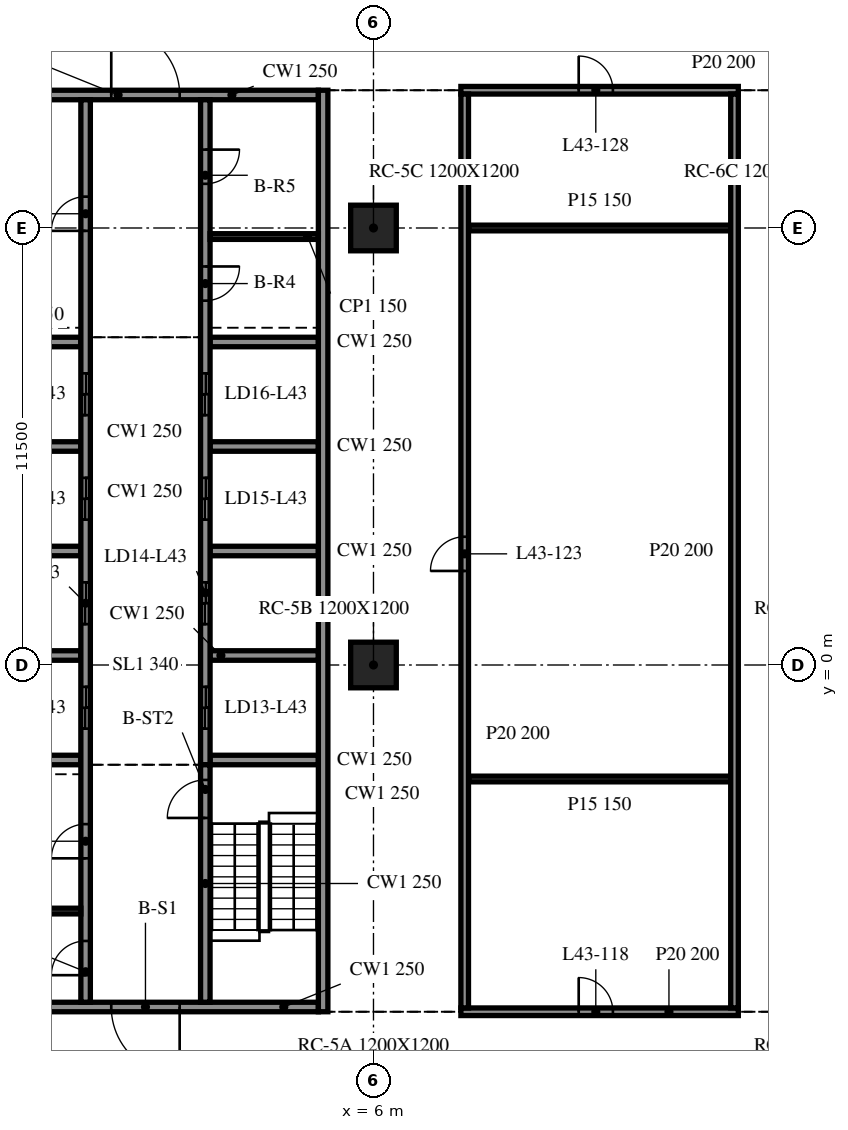
"""IFC4 building model, lengths in metres.
Left out: names, types, materials, properties, quantities, classifications, styles, units other than length and angle.
Written with IfcOpenShell. Run it as: python <this file> out.ifc"""

import sys

from ifc_helpers import new_model, si_unit, direction, frame, frame_2d, origin, origin_2d, place, context, subcontext, project, spatial, rectangle, extrude, element, fill, save


model = new_model("IFC4")
c1 = context("Model", 3, precision=1e-05, world=origin(), true_north=direction((0.0, 1.0)))
c2 = subcontext(c1, "Body", "Model", "MODEL_VIEW")
j1 = project(units=[si_unit("LENGTHUNIT", "METRE"), si_unit("PLANEANGLEUNIT", "RADIAN")], contexts=[c1])
p1 = place(None, origin())
s1 = spatial("IfcSite", under=j1, at=p1, CompositionType="ELEMENT")
p2 = place(p1, origin())
s2 = spatial("IfcBuilding", under=s1, at=p2, CompositionType="ELEMENT")
p3 = place(p2, frame((0.0, 0.0, 182.0)))
s3 = spatial("IfcBuildingStorey", under=s2, at=p3, CompositionType="ELEMENT", Elevation=182.0)
for number, where, z_axis, x_axis in (
    (1, (6.0, 0.0, -0.34), (0.0, 0.0, 1.0), (1.0, 0.0, 0.0)),
    (2, (6.0, 11.5, -0.34), (0.0, 0.0, 1.0), (1.0, 0.0, 0.0)),
):
    element("IfcColumn", number, at=place(p3, frame(where, z_axis=z_axis, x_axis=x_axis)), inside=s3, PredefinedType="COLUMN", context=c2, shape_type="SweptSolid", body=[
        extrude(rectangle(XDim=1.2, YDim=1.2, at=origin_2d()), origin(), (0.0, 0.0, 1.0), 3.8),
    ])
p4 = place(p3, frame((4.675, -9.125, 0.0), z_axis=(0.0, 0.0, 1.0), x_axis=(0.0, 1.0, 0.0)))
e3 = element("IfcWall", 3, at=p4, inside=s3, PredefinedType="SOLIDWALL", context=c2, shape_type="SweptSolid", body=[
    extrude(rectangle(XDim=24.25, YDim=0.25, at=frame_2d((12.125, 0.0))), origin(), (0.0, 0.0, 1.0), 3.46),
])
p5 = place(p3, frame((4.55, -9.0, 0.0), z_axis=(0.0, 0.0, 1.0), x_axis=(-1.0, 0.0, 0.0)))
e4 = element("IfcWall", 4, at=p5, inside=s3, PredefinedType="SOLIDWALL", context=c2, shape_type="SweptSolid", body=[
    extrude(rectangle(XDim=9.1, YDim=0.25, at=frame_2d((4.55, 0.0))), origin(), (0.0, 0.0, 1.0), 3.46),
])
p6 = place(p5, frame((3.65, 0.0, 0.0)))
e5 = element("IfcOpeningElement", 5, at=p6, cuts=e4, PredefinedType="OPENING", context=c2, shape_type="SweptSolid", body=[
    extrude(rectangle(XDim=1.8, YDim=2.1, at=frame_2d((0.9, 1.05))), frame((0.0, 0.135, 0.0), z_axis=(0.0, -1.0, 0.0), x_axis=(1.0, 0.0, 0.0)), (0.0, 0.0, 1.0), 0.27),
])
p7 = place(p3, frame((-4.55, 15.0, 0.0), z_axis=(0.0, 0.0, 1.0), x_axis=(1.0, 0.0, 0.0)))
e6 = element("IfcWall", 6, at=p7, inside=s3, PredefinedType="SOLIDWALL", context=c2, shape_type="SweptSolid", body=[
    extrude(rectangle(XDim=9.1, YDim=0.25, at=frame_2d((4.55, 0.0))), origin(), (0.0, 0.0, 1.0), 3.46),
])
p8 = place(p7, frame((3.65, 0.0, 0.0)))
e7 = element("IfcOpeningElement", 7, at=p8, cuts=e6, PredefinedType="OPENING", context=c2, shape_type="SweptSolid", body=[
    extrude(rectangle(XDim=1.8, YDim=2.1, at=frame_2d((0.9, 1.05))), frame((0.0, 0.135, 0.0), z_axis=(0.0, -1.0, 0.0), x_axis=(1.0, 0.0, 0.0)), (0.0, 0.0, 1.0), 0.27),
])
p9 = place(p3, frame((-1.575, -8.875, 0.0), z_axis=(0.0, 0.0, 1.0), x_axis=(0.0, 1.0, 0.0)))
e8 = element("IfcWall", 8, at=p9, inside=s3, PredefinedType="SOLIDWALL", context=c2, shape_type="SweptSolid", body=[
    extrude(rectangle(XDim=23.75, YDim=0.25, at=frame_2d((11.875, 0.0))), origin(), (0.0, 0.0, 1.0), 3.46),
])
p10 = place(p9, frame((7.2, 0.0, 0.0)))
e9 = element("IfcOpeningElement", 9, at=p10, cuts=e8, PredefinedType="OPENING", context=c2, shape_type="SweptSolid", body=[
    extrude(rectangle(XDim=1.1, YDim=2.1, at=frame_2d((0.55, 1.05))), frame((0.0, 0.135, 0.0), z_axis=(0.0, -1.0, 0.0), x_axis=(1.0, 0.0, 0.0)), (0.0, 0.0, 1.0), 0.27),
])
p11 = place(p9, frame((9.95, 0.0, 0.0)))
e10 = element("IfcOpeningElement", 10, at=p11, cuts=e8, PredefinedType="OPENING", context=c2, shape_type="SweptSolid", body=[
    extrude(rectangle(XDim=1.1, YDim=2.1, at=frame_2d((0.55, 1.05))), frame((0.0, 0.135, 0.0), z_axis=(0.0, -1.0, 0.0), x_axis=(1.0, 0.0, 0.0)), (0.0, 0.0, 1.0), 0.27),
])
p12 = place(p9, frame((12.7, 0.0, 0.0)))
e11 = element("IfcOpeningElement", 11, at=p12, cuts=e8, PredefinedType="OPENING", context=c2, shape_type="SweptSolid", body=[
    extrude(rectangle(XDim=1.1, YDim=2.1, at=frame_2d((0.55, 1.05))), frame((0.0, 0.135, 0.0), z_axis=(0.0, -1.0, 0.0), x_axis=(1.0, 0.0, 0.0)), (0.0, 0.0, 1.0), 0.27),
])
p13 = place(p9, frame((15.45, 0.0, 0.0)))
e12 = element("IfcOpeningElement", 12, at=p13, cuts=e8, PredefinedType="OPENING", context=c2, shape_type="SweptSolid", body=[
    extrude(rectangle(XDim=1.1, YDim=2.1, at=frame_2d((0.55, 1.05))), frame((0.0, 0.135, 0.0), z_axis=(0.0, -1.0, 0.0), x_axis=(1.0, 0.0, 0.0)), (0.0, 0.0, 1.0), 0.27),
])
p14 = place(p9, frame((0.712, 0.0, 0.0)))
e13 = element("IfcOpeningElement", 13, at=p14, cuts=e8, PredefinedType="OPENING", context=c2, shape_type="SweptSolid", body=[
    extrude(rectangle(XDim=0.9, YDim=2.1, at=frame_2d((0.45, 1.05))), frame((0.0, 0.135, 0.0), z_axis=(0.0, -1.0, 0.0), x_axis=(1.0, 0.0, 0.0)), (0.0, 0.0, 1.0), 0.27),
])
p15 = place(p9, frame((3.788, 0.0, 0.0)))
e14 = element("IfcOpeningElement", 14, at=p15, cuts=e8, PredefinedType="OPENING", context=c2, shape_type="SweptSolid", body=[
    extrude(rectangle(XDim=0.9, YDim=2.1, at=frame_2d((0.45, 1.05))), frame((0.0, 0.135, 0.0), z_axis=(0.0, -1.0, 0.0), x_axis=(1.0, 0.0, 0.0)), (0.0, 0.0, 1.0), 0.27),
])
p16 = place(p9, frame((20.3, 0.0, 0.0)))
e15 = element("IfcOpeningElement", 15, at=p16, cuts=e8, PredefinedType="OPENING", context=c2, shape_type="SweptSolid", body=[
    extrude(rectangle(XDim=0.9, YDim=2.1, at=frame_2d((0.45, 1.05))), frame((0.0, 0.135, 0.0), z_axis=(0.0, -1.0, 0.0), x_axis=(1.0, 0.0, 0.0)), (0.0, 0.0, 1.0), 0.27),
])
p17 = place(p3, frame((1.575, -8.875, 0.0), z_axis=(0.0, 0.0, 1.0), x_axis=(0.0, 1.0, 0.0)))
e16 = element("IfcWall", 16, at=p17, inside=s3, PredefinedType="SOLIDWALL", context=c2, shape_type="SweptSolid", body=[
    extrude(rectangle(XDim=6.25, YDim=0.25, at=frame_2d((3.125, 0.0))), origin(), (0.0, 0.0, 1.0), 3.46),
])
p18 = place(p17, frame((4.85, 0.0, 0.0)))
e17 = element("IfcOpeningElement", 17, at=p18, cuts=e16, PredefinedType="OPENING", context=c2, shape_type="SweptSolid", body=[
    extrude(rectangle(XDim=1.0, YDim=2.1, at=frame_2d((0.5, 1.05))), frame((0.0, 0.135, 0.0), z_axis=(0.0, -1.0, 0.0), x_axis=(1.0, 0.0, 0.0)), (0.0, 0.0, 1.0), 0.27),
])
p19 = place(p3, frame((1.575, 14.875, 0.0), z_axis=(0.0, 0.0, 1.0), x_axis=(0.0, -1.0, 0.0)))
e18 = element("IfcWall", 18, at=p19, inside=s3, PredefinedType="SOLIDWALL", context=c2, shape_type="SweptSolid", body=[
    extrude(rectangle(XDim=17.5, YDim=0.25, at=frame_2d((8.75, 0.0))), origin(), (0.0, 0.0, 1.0), 3.46),
])
p20 = place(p19, frame((15.45, 0.0, 0.0)))
e19 = element("IfcOpeningElement", 19, at=p20, cuts=e18, PredefinedType="OPENING", context=c2, shape_type="SweptSolid", body=[
    extrude(rectangle(XDim=1.1, YDim=2.1, at=frame_2d((0.55, 1.05))), frame((0.0, 0.135, 0.0), z_axis=(0.0, -1.0, 0.0), x_axis=(1.0, 0.0, 0.0)), (0.0, 0.0, 1.0), 0.27),
])
p21 = place(p19, frame((12.7, 0.0, 0.0)))
e20 = element("IfcOpeningElement", 20, at=p21, cuts=e18, PredefinedType="OPENING", context=c2, shape_type="SweptSolid", body=[
    extrude(rectangle(XDim=1.1, YDim=2.1, at=frame_2d((0.55, 1.05))), frame((0.0, 0.135, 0.0), z_axis=(0.0, -1.0, 0.0), x_axis=(1.0, 0.0, 0.0)), (0.0, 0.0, 1.0), 0.27),
])
p22 = place(p19, frame((9.95, 0.0, 0.0)))
e21 = element("IfcOpeningElement", 21, at=p22, cuts=e18, PredefinedType="OPENING", context=c2, shape_type="SweptSolid", body=[
    extrude(rectangle(XDim=1.1, YDim=2.1, at=frame_2d((0.55, 1.05))), frame((0.0, 0.135, 0.0), z_axis=(0.0, -1.0, 0.0), x_axis=(1.0, 0.0, 0.0)), (0.0, 0.0, 1.0), 0.27),
])
p23 = place(p19, frame((7.2, 0.0, 0.0)))
e22 = element("IfcOpeningElement", 22, at=p23, cuts=e18, PredefinedType="OPENING", context=c2, shape_type="SweptSolid", body=[
    extrude(rectangle(XDim=1.1, YDim=2.1, at=frame_2d((0.55, 1.05))), frame((0.0, 0.135, 0.0), z_axis=(0.0, -1.0, 0.0), x_axis=(1.0, 0.0, 0.0)), (0.0, 0.0, 1.0), 0.27),
])
p24 = place(p19, frame((4.387, 0.0, 0.0)))
e23 = element("IfcOpeningElement", 23, at=p24, cuts=e18, PredefinedType="OPENING", context=c2, shape_type="SweptSolid", body=[
    extrude(rectangle(XDim=0.9, YDim=2.1, at=frame_2d((0.45, 1.05))), frame((0.0, 0.135, 0.0), z_axis=(0.0, -1.0, 0.0), x_axis=(1.0, 0.0, 0.0)), (0.0, 0.0, 1.0), 0.27),
])
p25 = place(p19, frame((1.312, 0.0, 0.0)))
e24 = element("IfcOpeningElement", 24, at=p25, cuts=e18, PredefinedType="OPENING", context=c2, shape_type="SweptSolid", body=[
    extrude(rectangle(XDim=0.9, YDim=2.1, at=frame_2d((0.45, 1.05))), frame((0.0, 0.135, 0.0), z_axis=(0.0, -1.0, 0.0), x_axis=(1.0, 0.0, 0.0)), (0.0, 0.0, 1.0), 0.27),
])
for number, where, z_axis, x_axis in (
    (25, (-4.55, -2.5, 0.0), (0.0, 0.0, 1.0), (1.0, 0.0, 0.0)),
    (26, (-4.55, 0.25, 0.0), (0.0, 0.0, 1.0), (1.0, 0.0, 0.0)),
    (27, (-4.55, 3.0, 0.0), (0.0, 0.0, 1.0), (1.0, 0.0, 0.0)),
    (28, (-4.55, 5.75, 0.0), (0.0, 0.0, 1.0), (1.0, 0.0, 0.0)),
    (29, (-4.55, 8.5, 0.0), (0.0, 0.0, 1.0), (1.0, 0.0, 0.0)),
    (30, (1.7, -2.5, 0.0), (0.0, 0.0, 1.0), (1.0, 0.0, 0.0)),
    (31, (1.7, 0.25, 0.0), (0.0, 0.0, 1.0), (1.0, 0.0, 0.0)),
    (32, (1.7, 3.0, 0.0), (0.0, 0.0, 1.0), (1.0, 0.0, 0.0)),
    (33, (1.7, 5.75, 0.0), (0.0, 0.0, 1.0), (1.0, 0.0, 0.0)),
    (34, (1.7, 8.5, 0.0), (0.0, 0.0, 1.0), (1.0, 0.0, 0.0)),
):
    element("IfcWall", number, at=place(p3, frame(where, z_axis=z_axis, x_axis=x_axis)), inside=s3, PredefinedType="SOLIDWALL", context=c2, shape_type="SweptSolid", body=[
        extrude(rectangle(XDim=2.85, YDim=0.25, at=frame_2d((1.425, 0.0))), origin(), (0.0, 0.0, 1.0), 3.46),
    ])
for number, where, z_axis, x_axis in (
    (35, (-4.55, -6.475, 0.0), (0.0, 0.0, 1.0), (1.0, 0.0, 0.0)),
    (36, (1.7, 11.275, 0.0), (0.0, 0.0, 1.0), (1.0, 0.0, 0.0)),
):
    element("IfcWall", number, at=place(p3, frame(where, z_axis=z_axis, x_axis=x_axis)), inside=s3, PredefinedType="PARTITIONING", context=c2, shape_type="SweptSolid", body=[
        extrude(rectangle(XDim=2.85, YDim=0.15, at=frame_2d((1.425, 0.0))), origin(), (0.0, 0.0, 1.0), 3.46),
    ])
p26 = place(p3, frame((8.3, -9.125, 0.0), z_axis=(0.0, 0.0, 1.0), x_axis=(1.0, 0.0, 0.0)))
e37 = element("IfcWall", 37, at=p26, inside=s3, PredefinedType="PARTITIONING", context=c2, shape_type="SweptSolid", body=[
    extrude(rectangle(XDim=7.3, YDim=0.2, at=frame_2d((3.65, 0.0))), origin(), (0.0, 0.0, 1.0), 3.46),
])
p27 = place(p26, frame((3.1, 0.0, 0.0)))
e38 = element("IfcOpeningElement", 38, at=p27, cuts=e37, PredefinedType="OPENING", context=c2, shape_type="SweptSolid", body=[
    extrude(rectangle(XDim=0.9, YDim=2.1, at=frame_2d((0.45, 1.05))), frame((0.0, 0.11, 0.0), z_axis=(0.0, -1.0, 0.0), x_axis=(1.0, 0.0, 0.0)), (0.0, 0.0, 1.0), 0.22),
])
for number, where, z_axis, x_axis in (
    (39, (8.5, -3.0, 0.0), (0.0, 0.0, 1.0), (1.0, 0.0, 0.0)),
    (40, (8.5, 11.5, 0.0), (0.0, 0.0, 1.0), (1.0, 0.0, 0.0)),
):
    element("IfcWall", number, at=place(p3, frame(where, z_axis=z_axis, x_axis=x_axis)), inside=s3, PredefinedType="PARTITIONING", context=c2, shape_type="SweptSolid", body=[
        extrude(rectangle(XDim=6.9, YDim=0.15, at=frame_2d((3.45, 0.0))), origin(), (0.0, 0.0, 1.0), 3.46),
    ])
p28 = place(p3, frame((8.3, 15.125, 0.0), z_axis=(0.0, 0.0, 1.0), x_axis=(1.0, 0.0, 0.0)))
e41 = element("IfcWall", 41, at=p28, inside=s3, PredefinedType="PARTITIONING", context=c2, shape_type="SweptSolid", body=[
    extrude(rectangle(XDim=7.3, YDim=0.2, at=frame_2d((3.65, 0.0))), origin(), (0.0, 0.0, 1.0), 3.46),
])
p29 = place(p28, frame((3.1, 0.0, 0.0)))
e42 = element("IfcOpeningElement", 42, at=p29, cuts=e41, PredefinedType="OPENING", context=c2, shape_type="SweptSolid", body=[
    extrude(rectangle(XDim=0.9, YDim=2.1, at=frame_2d((0.45, 1.05))), frame((0.0, 0.11, 0.0), z_axis=(0.0, -1.0, 0.0), x_axis=(1.0, 0.0, 0.0)), (0.0, 0.0, 1.0), 0.22),
])
p30 = place(p3, frame((8.4, -9.025, 0.0), z_axis=(0.0, 0.0, 1.0), x_axis=(0.0, 1.0, 0.0)))
e43 = element("IfcWall", 43, at=p30, inside=s3, PredefinedType="PARTITIONING", context=c2, shape_type="SweptSolid", body=[
    extrude(rectangle(XDim=24.05, YDim=0.2, at=frame_2d((12.025, 0.0))), origin(), (0.0, 0.0, 1.0), 3.46),
])
p31 = place(p30, frame((11.5, 0.0, 0.0)))
e44 = element("IfcOpeningElement", 44, at=p31, cuts=e43, PredefinedType="OPENING", context=c2, shape_type="SweptSolid", body=[
    extrude(rectangle(XDim=0.9, YDim=2.1, at=frame_2d((0.45, 1.05))), frame((0.0, 0.11, 0.0), z_axis=(0.0, -1.0, 0.0), x_axis=(1.0, 0.0, 0.0)), (0.0, 0.0, 1.0), 0.22),
])
p32 = place(p3, frame((15.5, -9.025, 0.0), z_axis=(0.0, 0.0, 1.0), x_axis=(0.0, 1.0, 0.0)))
e45 = element("IfcWall", 45, at=p32, inside=s3, PredefinedType="PARTITIONING", context=c2, shape_type="SweptSolid", body=[
    extrude(rectangle(XDim=24.05, YDim=0.2, at=frame_2d((12.025, 0.0))), origin(), (0.0, 0.0, 1.0), 3.46),
])
p33 = place(p6, origin())
e46 = element("IfcDoor", 46, at=p33, inside=s3, OperationType="DOUBLE_DOOR_SINGLE_SWING", PredefinedType="DOOR", context=c2, shape_type="SweptSolid", body=[
    extrude(rectangle(XDim=1.8, YDim=2.1, at=frame_2d((0.9, 1.05))), frame((0.0, 0.025, 0.0), z_axis=(0.0, -1.0, 0.0), x_axis=(1.0, 0.0, 0.0)), (0.0, 0.0, 1.0), 0.05),
])
fill(e5, e46)
p34 = place(p8, origin())
e47 = element("IfcDoor", 47, at=p34, inside=s3, OperationType="DOUBLE_DOOR_SINGLE_SWING", PredefinedType="DOOR", context=c2, shape_type="SweptSolid", body=[
    extrude(rectangle(XDim=1.8, YDim=2.1, at=frame_2d((0.9, 1.05))), frame((0.0, 0.025, 0.0), z_axis=(0.0, -1.0, 0.0), x_axis=(1.0, 0.0, 0.0)), (0.0, 0.0, 1.0), 0.05),
])
fill(e7, e47)
p35 = place(p20, origin())
e48 = element("IfcDoor", 48, at=p35, inside=s3, OperationType="DOUBLE_DOOR_SLIDING", PredefinedType="DOOR", context=c2, shape_type="SweptSolid", body=[
    extrude(rectangle(XDim=1.1, YDim=2.1, at=frame_2d((0.55, 1.05))), frame((0.0, 0.025, 0.0), z_axis=(0.0, -1.0, 0.0), x_axis=(1.0, 0.0, 0.0)), (0.0, 0.0, 1.0), 0.05),
])
fill(e19, e48)
p36 = place(p21, origin())
e49 = element("IfcDoor", 49, at=p36, inside=s3, OperationType="DOUBLE_DOOR_SLIDING", PredefinedType="DOOR", context=c2, shape_type="SweptSolid", body=[
    extrude(rectangle(XDim=1.1, YDim=2.1, at=frame_2d((0.55, 1.05))), frame((0.0, 0.025, 0.0), z_axis=(0.0, -1.0, 0.0), x_axis=(1.0, 0.0, 0.0)), (0.0, 0.0, 1.0), 0.05),
])
fill(e20, e49)
p37 = place(p22, origin())
e50 = element("IfcDoor", 50, at=p37, inside=s3, OperationType="DOUBLE_DOOR_SLIDING", PredefinedType="DOOR", context=c2, shape_type="SweptSolid", body=[
    extrude(rectangle(XDim=1.1, YDim=2.1, at=frame_2d((0.55, 1.05))), frame((0.0, 0.025, 0.0), z_axis=(0.0, -1.0, 0.0), x_axis=(1.0, 0.0, 0.0)), (0.0, 0.0, 1.0), 0.05),
])
fill(e21, e50)
p38 = place(p23, origin())
e51 = element("IfcDoor", 51, at=p38, inside=s3, OperationType="DOUBLE_DOOR_SLIDING", PredefinedType="DOOR", context=c2, shape_type="SweptSolid", body=[
    extrude(rectangle(XDim=1.1, YDim=2.1, at=frame_2d((0.55, 1.05))), frame((0.0, 0.025, 0.0), z_axis=(0.0, -1.0, 0.0), x_axis=(1.0, 0.0, 0.0)), (0.0, 0.0, 1.0), 0.05),
])
fill(e22, e51)
p39 = place(p10, origin())
e52 = element("IfcDoor", 52, at=p39, inside=s3, OperationType="DOUBLE_DOOR_SLIDING", PredefinedType="DOOR", context=c2, shape_type="SweptSolid", body=[
    extrude(rectangle(XDim=1.1, YDim=2.1, at=frame_2d((0.55, 1.05))), frame((0.0, 0.025, 0.0), z_axis=(0.0, -1.0, 0.0), x_axis=(1.0, 0.0, 0.0)), (0.0, 0.0, 1.0), 0.05),
])
fill(e9, e52)
p40 = place(p11, origin())
e53 = element("IfcDoor", 53, at=p40, inside=s3, OperationType="DOUBLE_DOOR_SLIDING", PredefinedType="DOOR", context=c2, shape_type="SweptSolid", body=[
    extrude(rectangle(XDim=1.1, YDim=2.1, at=frame_2d((0.55, 1.05))), frame((0.0, 0.025, 0.0), z_axis=(0.0, -1.0, 0.0), x_axis=(1.0, 0.0, 0.0)), (0.0, 0.0, 1.0), 0.05),
])
fill(e10, e53)
p41 = place(p12, origin())
e54 = element("IfcDoor", 54, at=p41, inside=s3, OperationType="DOUBLE_DOOR_SLIDING", PredefinedType="DOOR", context=c2, shape_type="SweptSolid", body=[
    extrude(rectangle(XDim=1.1, YDim=2.1, at=frame_2d((0.55, 1.05))), frame((0.0, 0.025, 0.0), z_axis=(0.0, -1.0, 0.0), x_axis=(1.0, 0.0, 0.0)), (0.0, 0.0, 1.0), 0.05),
])
fill(e11, e54)
p42 = place(p13, origin())
e55 = element("IfcDoor", 55, at=p42, inside=s3, OperationType="DOUBLE_DOOR_SLIDING", PredefinedType="DOOR", context=c2, shape_type="SweptSolid", body=[
    extrude(rectangle(XDim=1.1, YDim=2.1, at=frame_2d((0.55, 1.05))), frame((0.0, 0.025, 0.0), z_axis=(0.0, -1.0, 0.0), x_axis=(1.0, 0.0, 0.0)), (0.0, 0.0, 1.0), 0.05),
])
fill(e12, e55)
p43 = place(p14, origin())
e56 = element("IfcDoor", 56, at=p43, inside=s3, OperationType="SINGLE_SWING_LEFT", PredefinedType="DOOR", context=c2, shape_type="SweptSolid", body=[
    extrude(rectangle(XDim=0.9, YDim=2.1, at=frame_2d((0.45, 1.05))), frame((0.0, 0.025, 0.0), z_axis=(0.0, -1.0, 0.0), x_axis=(1.0, 0.0, 0.0)), (0.0, 0.0, 1.0), 0.05),
])
fill(e13, e56)
p44 = place(p15, origin())
e57 = element("IfcDoor", 57, at=p44, inside=s3, OperationType="SINGLE_SWING_RIGHT", PredefinedType="DOOR", context=c2, shape_type="SweptSolid", body=[
    extrude(rectangle(XDim=0.9, YDim=2.1, at=frame_2d((0.45, 1.05))), frame((0.0, 0.025, 0.0), z_axis=(0.0, -1.0, 0.0), x_axis=(1.0, 0.0, 0.0)), (0.0, 0.0, 1.0), 0.05),
])
fill(e14, e57)
p45 = place(p16, origin())
e58 = element("IfcDoor", 58, at=p45, inside=s3, OperationType="SINGLE_SWING_LEFT", PredefinedType="DOOR", context=c2, shape_type="SweptSolid", body=[
    extrude(rectangle(XDim=0.9, YDim=2.1, at=frame_2d((0.45, 1.05))), frame((0.0, 0.025, 0.0), z_axis=(0.0, -1.0, 0.0), x_axis=(1.0, 0.0, 0.0)), (0.0, 0.0, 1.0), 0.05),
])
fill(e15, e58)
p46 = place(p24, origin())
e59 = element("IfcDoor", 59, at=p46, inside=s3, OperationType="SINGLE_SWING_RIGHT", PredefinedType="DOOR", context=c2, shape_type="SweptSolid", body=[
    extrude(rectangle(XDim=0.9, YDim=2.1, at=frame_2d((0.45, 1.05))), frame((0.0, 0.025, 0.0), z_axis=(0.0, -1.0, 0.0), x_axis=(1.0, 0.0, 0.0)), (0.0, 0.0, 1.0), 0.05),
])
fill(e23, e59)
p47 = place(p25, origin())
e60 = element("IfcDoor", 60, at=p47, inside=s3, OperationType="SINGLE_SWING_LEFT", PredefinedType="DOOR", context=c2, shape_type="SweptSolid", body=[
    extrude(rectangle(XDim=0.9, YDim=2.1, at=frame_2d((0.45, 1.05))), frame((0.0, 0.025, 0.0), z_axis=(0.0, -1.0, 0.0), x_axis=(1.0, 0.0, 0.0)), (0.0, 0.0, 1.0), 0.05),
])
fill(e24, e60)
p48 = place(p18, origin())
e61 = element("IfcDoor", 61, at=p48, inside=s3, OperationType="SINGLE_SWING_RIGHT", PredefinedType="DOOR", context=c2, shape_type="SweptSolid", body=[
    extrude(rectangle(XDim=1.0, YDim=2.1, at=frame_2d((0.5, 1.05))), frame((0.0, 0.025, 0.0), z_axis=(0.0, -1.0, 0.0), x_axis=(1.0, 0.0, 0.0)), (0.0, 0.0, 1.0), 0.05),
])
fill(e17, e61)
p49 = place(p27, origin())
e62 = element("IfcDoor", 62, at=p49, inside=s3, OperationType="SINGLE_SWING_LEFT", PredefinedType="DOOR", context=c2, shape_type="SweptSolid", body=[
    extrude(rectangle(XDim=0.9, YDim=2.1, at=frame_2d((0.45, 1.05))), frame((0.0, 0.025, 0.0), z_axis=(0.0, -1.0, 0.0), x_axis=(1.0, 0.0, 0.0)), (0.0, 0.0, 1.0), 0.05),
])
fill(e38, e62)
p50 = place(p31, origin())
e63 = element("IfcDoor", 63, at=p50, inside=s3, OperationType="SINGLE_SWING_RIGHT", PredefinedType="DOOR", context=c2, shape_type="SweptSolid", body=[
    extrude(rectangle(XDim=0.9, YDim=2.1, at=frame_2d((0.45, 1.05))), frame((0.0, 0.025, 0.0), z_axis=(0.0, -1.0, 0.0), x_axis=(1.0, 0.0, 0.0)), (0.0, 0.0, 1.0), 0.05),
])
fill(e44, e63)
p51 = place(p29, origin())
e64 = element("IfcDoor", 64, at=p51, inside=s3, OperationType="SINGLE_SWING_RIGHT", PredefinedType="DOOR", context=c2, shape_type="SweptSolid", body=[
    extrude(rectangle(XDim=0.9, YDim=2.1, at=frame_2d((0.45, 1.05))), frame((0.0, 0.025, 0.0), z_axis=(0.0, -1.0, 0.0), x_axis=(1.0, 0.0, 0.0)), (0.0, 0.0, 1.0), 0.05),
])
fill(e42, e64)
save(model, sys.argv[1])
